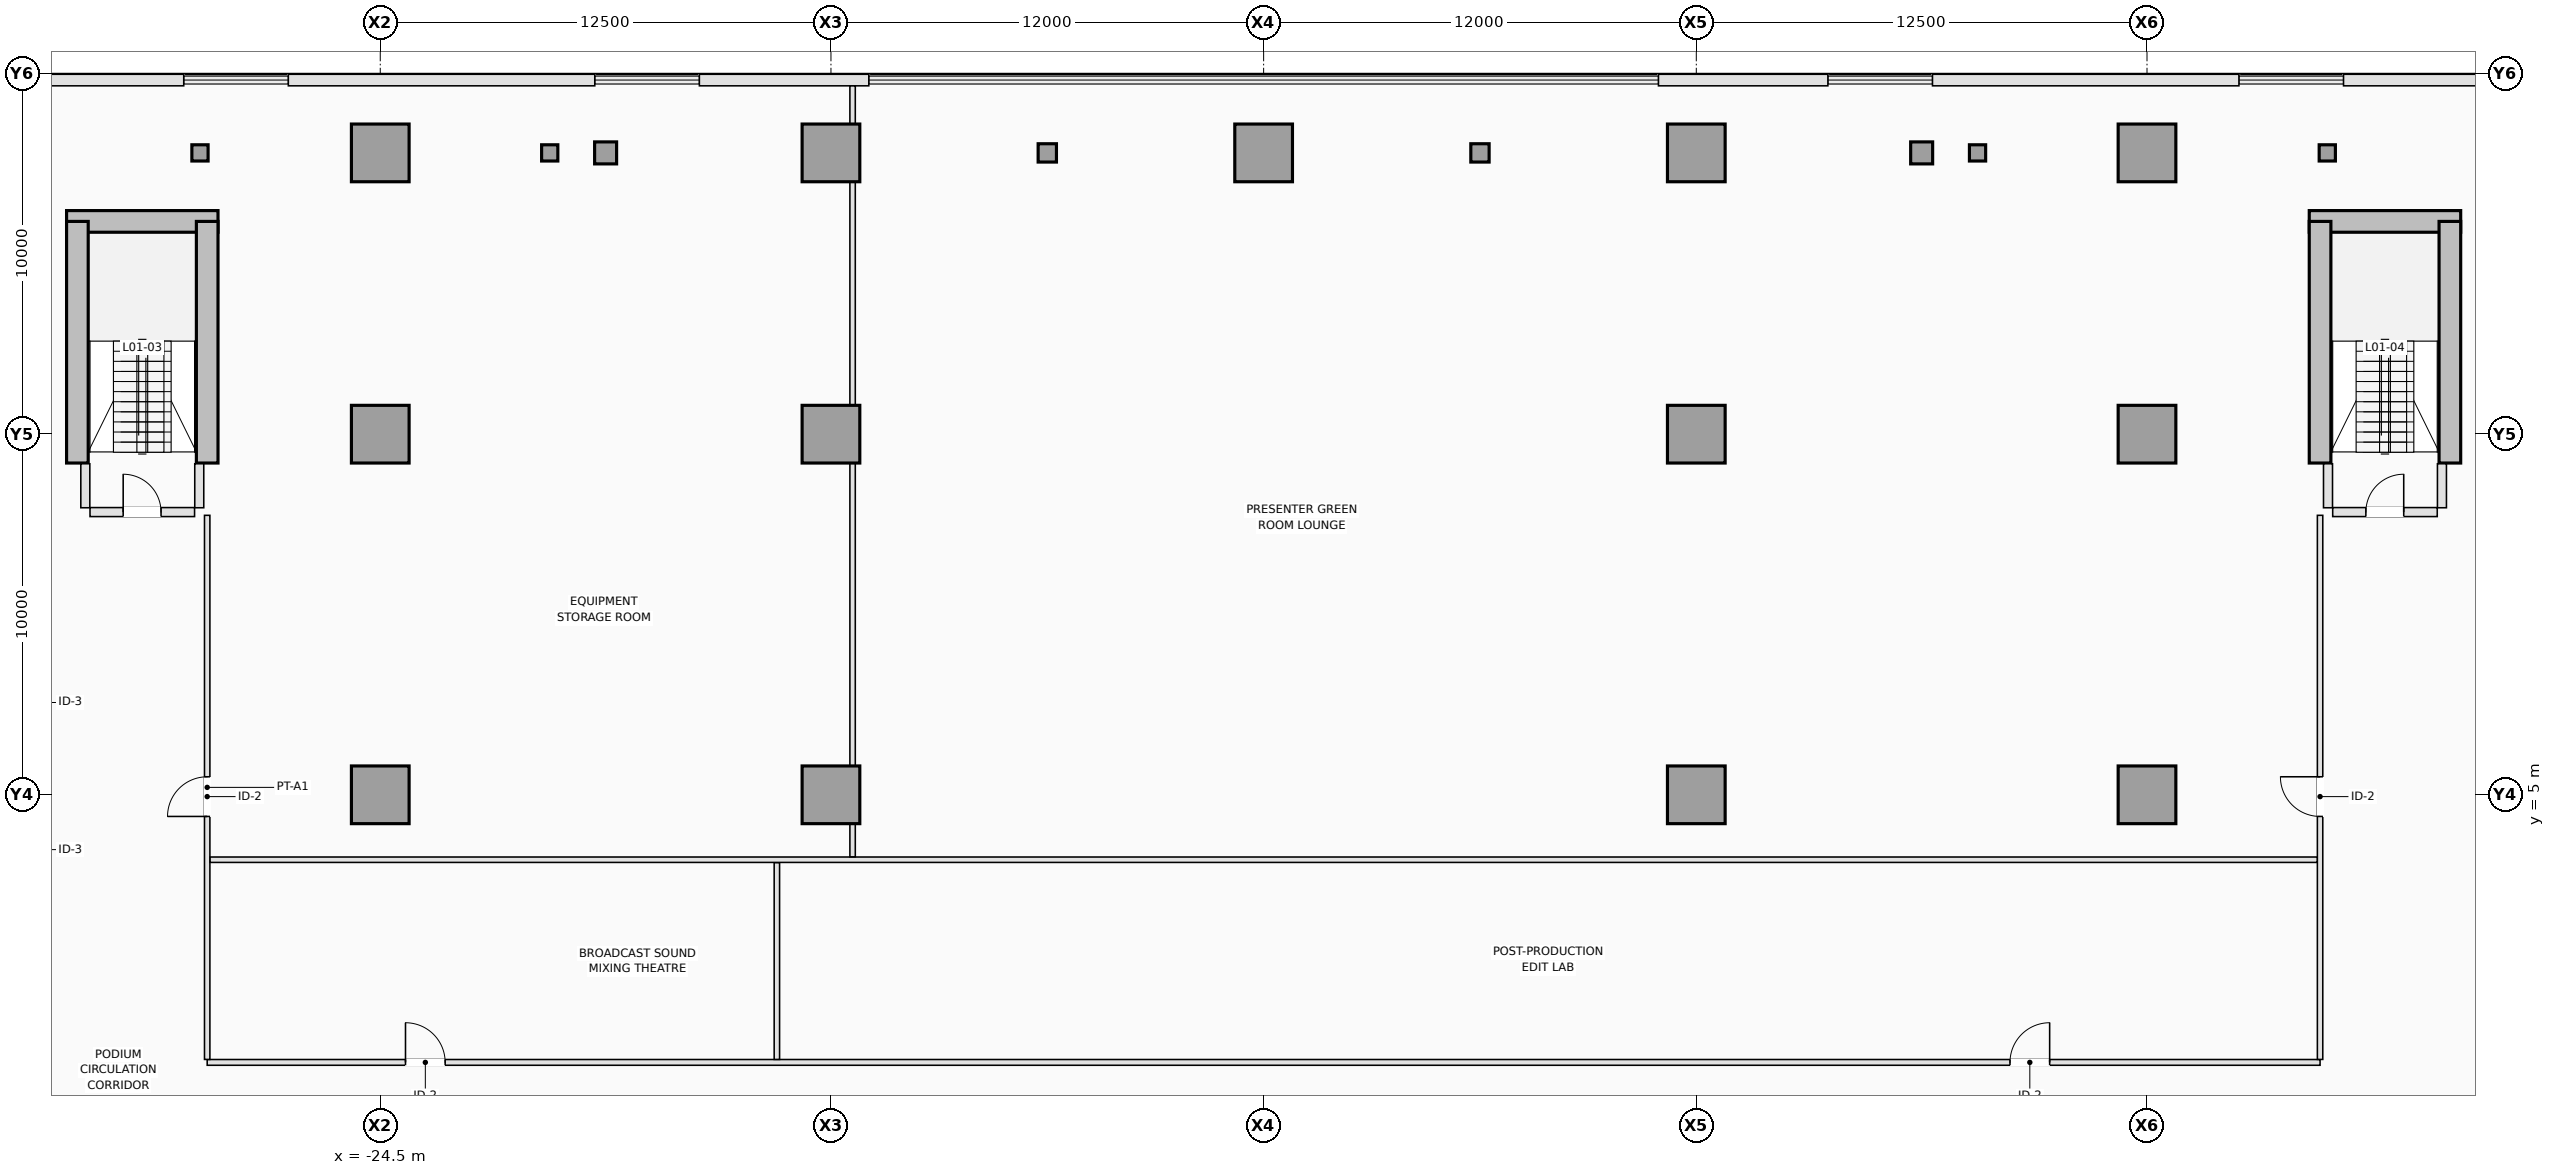
"""IFC4 building model, lengths in metres.
Left out: names, types, materials, properties, quantities, classifications, styles, units other than length and angle.
Written with IfcOpenShell. Run it as: python <this file> out.ifc"""

import sys

from ifc_helpers import new_model, si_unit, direction, frame, frame_2d, origin, origin_2d, place, context, subcontext, project, spatial, rectangle, hollow_circle, extrude, element, fill, save


model = new_model("IFC4")
c1 = context("Model", 3, precision=1e-05, world=origin(), true_north=direction((0.0, 1.0)))
c2 = subcontext(c1, "Body", "Model", "MODEL_VIEW")
j1 = project(units=[si_unit("LENGTHUNIT", "METRE"), si_unit("PLANEANGLEUNIT", "RADIAN")], contexts=[c1])
p1 = place(None, origin())
s1 = spatial("IfcSite", under=j1, at=p1, CompositionType="ELEMENT")
p2 = place(p1, origin())
s2 = spatial("IfcBuilding", under=s1, at=p2, CompositionType="ELEMENT")
p3 = place(p2, frame((0.0, 0.0, 5.0)))
s3 = spatial("IfcBuildingStorey", under=s2, at=p3, CompositionType="ELEMENT", Elevation=5.0)
p4 = place(p3, frame((-33.2, 20.9, 0.0), z_axis=(0.0, 0.0, 1.0), x_axis=(1.0, 0.0, 0.0)))
e1 = element("IfcWall", 1, at=p4, inside=s3, PredefinedType="SHEAR", context=c2, shape_type="SweptSolid", body=[
    extrude(rectangle(XDim=4.2, YDim=0.6, at=frame_2d((2.1, 0.0))), origin(), (0.0, 0.0, 1.0), 4.5),
])
for number, where, z_axis, x_axis in (
    (2, (-32.9, 14.2, 0.0), (0.0, 0.0, 1.0), (0.0, 1.0, 0.0)),
    (3, (-29.3, 14.2, 0.0), (0.0, 0.0, 1.0), (0.0, 1.0, 0.0)),
):
    element("IfcWall", number, at=place(p3, frame(where, z_axis=z_axis, x_axis=x_axis)), inside=s3, PredefinedType="SHEAR", context=c2, shape_type="SweptSolid", body=[
        extrude(rectangle(XDim=6.7, YDim=0.6, at=frame_2d((3.35, 0.0))), origin(), (0.0, 0.0, 1.0), 4.5),
    ])
p5 = place(p3, frame((29.0, 20.9, 0.0), z_axis=(0.0, 0.0, 1.0), x_axis=(1.0, 0.0, 0.0)))
e4 = element("IfcWall", 4, at=p5, inside=s3, PredefinedType="SHEAR", context=c2, shape_type="SweptSolid", body=[
    extrude(rectangle(XDim=4.2, YDim=0.6, at=frame_2d((2.1, 0.0))), origin(), (0.0, 0.0, 1.0), 4.5),
])
for number, where, z_axis, x_axis in (
    (5, (29.3, 14.2, 0.0), (0.0, 0.0, 1.0), (0.0, 1.0, 0.0)),
    (6, (32.9, 14.2, 0.0), (0.0, 0.0, 1.0), (0.0, 1.0, 0.0)),
):
    element("IfcWall", number, at=place(p3, frame(where, z_axis=z_axis, x_axis=x_axis)), inside=s3, PredefinedType="SHEAR", context=c2, shape_type="SweptSolid", body=[
        extrude(rectangle(XDim=6.7, YDim=0.6, at=frame_2d((3.35, 0.0))), origin(), (0.0, 0.0, 1.0), 4.5),
    ])
for number, where, z_axis, x_axis in (
    (7, (-24.5, 5.0, 0.0), (0.0, 0.0, 1.0), (1.0, 0.0, 0.0)),
    (8, (-12.0, 5.0, 0.0), (0.0, 0.0, 1.0), (1.0, 0.0, 0.0)),
    (9, (12.0, 5.0, 0.0), (0.0, 0.0, 1.0), (1.0, 0.0, 0.0)),
    (10, (24.5, 5.0, 0.0), (0.0, 0.0, 1.0), (1.0, 0.0, 0.0)),
    (11, (-24.5, 15.0, 0.0), (0.0, 0.0, 1.0), (1.0, 0.0, 0.0)),
    (12, (-12.0, 15.0, 0.0), (0.0, 0.0, 1.0), (1.0, 0.0, 0.0)),
    (13, (12.0, 15.0, 0.0), (0.0, 0.0, 1.0), (1.0, 0.0, 0.0)),
    (14, (24.5, 15.0, 0.0), (0.0, 0.0, 1.0), (1.0, 0.0, 0.0)),
    (15, (-24.5, 22.8, 0.0), (0.0, 0.0, 1.0), (1.0, 0.0, 0.0)),
    (16, (-12.0, 22.8, 0.0), (0.0, 0.0, 1.0), (1.0, 0.0, 0.0)),
    (17, (0.0, 22.8, 0.0), (0.0, 0.0, 1.0), (1.0, 0.0, 0.0)),
    (18, (12.0, 22.8, 0.0), (0.0, 0.0, 1.0), (1.0, 0.0, 0.0)),
    (19, (24.5, 22.8, 0.0), (0.0, 0.0, 1.0), (1.0, 0.0, 0.0)),
):
    element("IfcColumn", number, at=place(p3, frame(where, z_axis=z_axis, x_axis=x_axis)), inside=s3, PredefinedType="COLUMN", context=c2, shape_type="SweptSolid", body=[
        extrude(rectangle(XDim=1.6, YDim=1.6, at=origin_2d()), origin(), (0.0, 0.0, 1.0), 4.5),
    ])
for number, where, z_axis, x_axis in (
    (20, (-18.25, 22.8, 0.0), (0.0, 0.0, 1.0), (1.0, 0.0, 0.0)),
    (21, (18.25, 22.8, 0.0), (0.0, 0.0, 1.0), (1.0, 0.0, 0.0)),
):
    element("IfcColumn", number, at=place(p3, frame(where, z_axis=z_axis, x_axis=x_axis)), inside=s3, PredefinedType="COLUMN", context=c2, shape_type="SweptSolid", body=[
        extrude(hollow_circle(Radius=0.305, WallThickness=0.025, at=origin_2d()), origin(), (0.0, 0.0, 1.0), 4.5),
    ])
for number, where, z_axis, x_axis in (
    (22, (-6.0, 22.8, 0.0), (0.0, 0.0, 1.0), (1.0, 0.0, 0.0)),
    (23, (6.0, 22.8, 0.0), (0.0, 0.0, 1.0), (1.0, 0.0, 0.0)),
):
    element("IfcColumn", number, at=place(p3, frame(where, z_axis=z_axis, x_axis=x_axis)), inside=s3, PredefinedType="COLUMN", context=c2, shape_type="SweptSolid", body=[
        extrude(hollow_circle(Radius=0.254, WallThickness=0.022, at=origin_2d()), origin(), (0.0, 0.0, 1.0), 4.5),
    ])
for number, where, z_axis, x_axis in (
    (24, (-29.5, 22.8, 0.0), (0.0, 0.0, 1.0), (1.0, 0.0, 0.0)),
    (25, (-19.8, 22.8, 0.0), (0.0, 0.0, 1.0), (1.0, 0.0, 0.0)),
    (26, (19.8, 22.8, 0.0), (0.0, 0.0, 1.0), (1.0, 0.0, 0.0)),
    (27, (29.5, 22.8, 0.0), (0.0, 0.0, 1.0), (1.0, 0.0, 0.0)),
):
    element("IfcColumn", number, at=place(p3, frame(where, z_axis=z_axis, x_axis=x_axis)), inside=s3, PredefinedType="PILASTER", context=c2, shape_type="SweptSolid", body=[
        extrude(rectangle(XDim=0.45, YDim=0.45, at=origin_2d()), origin(), (0.0, 0.0, 1.0), 4.5),
    ])
p6 = place(p3, frame((-34.9, 24.82, 0.0), z_axis=(0.0, 0.0, 1.0), x_axis=(1.0, 0.0, 0.0)))
e28 = element("IfcWall", 28, at=p6, inside=s3, PredefinedType="STANDARD", context=c2, shape_type="SweptSolid", body=[
    extrude(rectangle(XDim=4.949, YDim=0.32, at=frame_2d((2.475, 0.0))), origin(), (0.0, 0.0, 1.0), 4.2),
])
p7 = place(p3, frame((-27.05, 24.82, 0.0), z_axis=(0.0, 0.0, 1.0), x_axis=(1.0, 0.0, 0.0)))
e29 = element("IfcWall", 29, at=p7, inside=s3, PredefinedType="STANDARD", context=c2, shape_type="SweptSolid", body=[
    extrude(rectangle(XDim=8.499, YDim=0.32, at=frame_2d((4.25, 0.0))), origin(), (0.0, 0.0, 1.0), 4.2),
])
for number, where, z_axis, x_axis in (
    (30, (-15.649, 24.82, 0.0), (0.0, 0.0, 1.0), (1.0, 0.0, 0.0)),
    (31, (10.95, 24.82, 0.0), (0.0, 0.0, 1.0), (1.0, 0.0, 0.0)),
):
    element("IfcWall", number, at=place(p3, frame(where, z_axis=z_axis, x_axis=x_axis)), inside=s3, PredefinedType="STANDARD", context=c2, shape_type="SweptSolid", body=[
        extrude(rectangle(XDim=4.699, YDim=0.32, at=frame_2d((2.35, 0.0))), origin(), (0.0, 0.0, 1.0), 4.2),
    ])
p8 = place(p3, frame((18.551, 24.82, 0.0), z_axis=(0.0, 0.0, 1.0), x_axis=(1.0, 0.0, 0.0)))
e32 = element("IfcWall", 32, at=p8, inside=s3, PredefinedType="STANDARD", context=c2, shape_type="SweptSolid", body=[
    extrude(rectangle(XDim=8.499, YDim=0.32, at=frame_2d((4.25, 0.0))), origin(), (0.0, 0.0, 1.0), 4.2),
])
p9 = place(p3, frame((29.95, 24.82, 0.0), z_axis=(0.0, 0.0, 1.0), x_axis=(1.0, 0.0, 0.0)))
e33 = element("IfcWall", 33, at=p9, inside=s3, PredefinedType="STANDARD", context=c2, shape_type="SweptSolid", body=[
    extrude(rectangle(XDim=4.949, YDim=0.32, at=frame_2d((2.475, 0.0))), origin(), (0.0, 0.0, 1.0), 4.2),
])
p10 = place(p3, frame((-32.55, 12.84, 0.0), z_axis=(0.0, 0.0, 1.0), x_axis=(1.0, 0.0, 0.0)))
e34 = element("IfcWall", 34, at=p10, inside=s3, PredefinedType="PARTITIONING", context=c2, shape_type="SweptSolid", body=[
    extrude(rectangle(XDim=2.9, YDim=0.25, at=frame_2d((1.45, 0.0))), origin(), (0.0, 0.0, 1.0), 4.2),
])
p11 = place(p10, frame((0.92, 0.0, 0.0)))
e35 = element("IfcOpeningElement", 35, at=p11, cuts=e34, PredefinedType="OPENING", context=c2, shape_type="SweptSolid", body=[
    extrude(rectangle(XDim=1.05, YDim=2.15, at=frame_2d((0.525, 1.075))), frame((0.0, 0.135, 0.0), z_axis=(0.0, -1.0, 0.0), x_axis=(1.0, 0.0, 0.0)), (0.0, 0.0, 1.0), 0.27),
])
p12 = place(p3, frame((29.65, 12.84, 0.0), z_axis=(0.0, 0.0, 1.0), x_axis=(1.0, 0.0, 0.0)))
e36 = element("IfcWall", 36, at=p12, inside=s3, PredefinedType="PARTITIONING", context=c2, shape_type="SweptSolid", body=[
    extrude(rectangle(XDim=2.9, YDim=0.25, at=frame_2d((1.45, 0.0))), origin(), (0.0, 0.0, 1.0), 4.2),
])
p13 = place(p12, frame((0.92, 0.0, 0.0)))
e37 = element("IfcOpeningElement", 37, at=p13, cuts=e36, PredefinedType="OPENING", context=c2, shape_type="SweptSolid", body=[
    extrude(rectangle(XDim=1.05, YDim=2.15, at=frame_2d((0.525, 1.075))), frame((0.0, 0.135, 0.0), z_axis=(0.0, -1.0, 0.0), x_axis=(1.0, 0.0, 0.0)), (0.0, 0.0, 1.0), 0.27),
])
for number, where, z_axis, x_axis in (
    (38, (-32.68, 12.96, 0.0), (0.0, 0.0, 1.0), (0.0, 1.0, 0.0)),
    (39, (-29.52, 12.96, 0.0), (0.0, 0.0, 1.0), (0.0, 1.0, 0.0)),
    (40, (29.52, 12.96, 0.0), (0.0, 0.0, 1.0), (0.0, 1.0, 0.0)),
    (41, (32.68, 12.96, 0.0), (0.0, 0.0, 1.0), (0.0, 1.0, 0.0)),
):
    element("IfcWall", number, at=place(p3, frame(where, z_axis=z_axis, x_axis=x_axis)), inside=s3, PredefinedType="PARTITIONING", context=c2, shape_type="SweptSolid", body=[
        extrude(rectangle(XDim=1.22, YDim=0.25, at=frame_2d((0.61, 0.0))), origin(), (0.0, 0.0, 1.0), 4.2),
    ])
p14 = place(p3, frame((-29.3, -2.42, 0.0), z_axis=(0.0, 0.0, 1.0), x_axis=(1.0, 0.0, 0.0)))
e42 = element("IfcWall", 42, at=p14, inside=s3, PredefinedType="PARTITIONING", context=c2, shape_type="SweptSolid", body=[
    extrude(rectangle(XDim=58.6, YDim=0.16, at=frame_2d((29.3, 0.0))), origin(), (0.0, 0.0, 1.0), 4.2),
])
p15 = place(p14, frame((5.5, 0.0, 0.0)))
e43 = element("IfcOpeningElement", 43, at=p15, cuts=e42, PredefinedType="OPENING", context=c2, shape_type="SweptSolid", body=[
    extrude(rectangle(XDim=1.1, YDim=2.15, at=frame_2d((0.55, 1.075))), frame((0.0, 0.09, 0.0), z_axis=(0.0, -1.0, 0.0), x_axis=(1.0, 0.0, 0.0)), (0.0, 0.0, 1.0), 0.18),
])
p16 = place(p14, frame((50.0, 0.0, 0.0)))
e44 = element("IfcOpeningElement", 44, at=p16, cuts=e42, PredefinedType="OPENING", context=c2, shape_type="SweptSolid", body=[
    extrude(rectangle(XDim=1.1, YDim=2.15, at=frame_2d((0.55, 1.075))), frame((0.0, 0.09, 0.0), z_axis=(0.0, -1.0, 0.0), x_axis=(1.0, 0.0, 0.0)), (0.0, 0.0, 1.0), 0.18),
])
p17 = place(p3, frame((-29.3, -2.338, 0.0), z_axis=(0.0, 0.0, 1.0), x_axis=(0.0, 1.0, 0.0)))
e45 = element("IfcWall", 45, at=p17, inside=s3, PredefinedType="PARTITIONING", context=c2, shape_type="SweptSolid", body=[
    extrude(rectangle(XDim=15.088, YDim=0.15, at=frame_2d((7.544, 0.0))), origin(), (0.0, 0.0, 1.0), 4.2),
])
p18 = place(p17, frame((6.738, 0.0, 0.0)))
e46 = element("IfcOpeningElement", 46, at=p18, cuts=e45, PredefinedType="OPENING", context=c2, shape_type="SweptSolid", body=[
    extrude(rectangle(XDim=1.1, YDim=2.15, at=frame_2d((0.55, 1.075))), frame((0.0, 0.085, 0.0), z_axis=(0.0, -1.0, 0.0), x_axis=(1.0, 0.0, 0.0)), (0.0, 0.0, 1.0), 0.17),
])
p19 = place(p3, frame((29.3, -2.338, 0.0), z_axis=(0.0, 0.0, 1.0), x_axis=(0.0, 1.0, 0.0)))
e47 = element("IfcWall", 47, at=p19, inside=s3, PredefinedType="PARTITIONING", context=c2, shape_type="SweptSolid", body=[
    extrude(rectangle(XDim=15.088, YDim=0.15, at=frame_2d((7.544, 0.0))), origin(), (0.0, 0.0, 1.0), 4.2),
])
p20 = place(p19, frame((6.738, 0.0, 0.0)))
e48 = element("IfcOpeningElement", 48, at=p20, cuts=e47, PredefinedType="OPENING", context=c2, shape_type="SweptSolid", body=[
    extrude(rectangle(XDim=1.1, YDim=2.15, at=frame_2d((0.55, 1.075))), frame((0.0, 0.085, 0.0), z_axis=(0.0, -1.0, 0.0), x_axis=(1.0, 0.0, 0.0)), (0.0, 0.0, 1.0), 0.17),
])
p21 = place(p3, frame((-13.5, -2.338, 0.0), z_axis=(0.0, 0.0, 1.0), x_axis=(0.0, 1.0, 0.0)))
e49 = element("IfcWall", 49, at=p21, inside=s3, PredefinedType="PARTITIONING", context=c2, shape_type="SweptSolid", body=[
    extrude(rectangle(XDim=5.458, YDim=0.15, at=frame_2d((2.729, 0.0))), origin(), (0.0, 0.0, 1.0), 4.2),
])
p22 = place(p3, frame((-29.22, 3.2, 0.0), z_axis=(0.0, 0.0, 1.0), x_axis=(1.0, 0.0, 0.0)))
e50 = element("IfcWall", 50, at=p22, inside=s3, PredefinedType="PARTITIONING", context=c2, shape_type="SweptSolid", body=[
    extrude(rectangle(XDim=58.44, YDim=0.15, at=frame_2d((29.22, 0.0))), origin(), (0.0, 0.0, 1.0), 4.2),
])
p23 = place(p3, frame((-11.4, 3.28, 0.0), z_axis=(0.0, 0.0, 1.0), x_axis=(0.0, 1.0, 0.0)))
e51 = element("IfcWall", 51, at=p23, inside=s3, PredefinedType="PARTITIONING", context=c2, shape_type="SweptSolid", body=[
    extrude(rectangle(XDim=0.918, YDim=0.15, at=frame_2d((0.459, 0.0))), origin(), (0.0, 0.0, 1.0), 4.2),
])
p24 = place(p3, frame((-11.4, 5.802, 0.0), z_axis=(0.0, 0.0, 1.0), x_axis=(0.0, 1.0, 0.0)))
e52 = element("IfcWall", 52, at=p24, inside=s3, PredefinedType="PARTITIONING", context=c2, shape_type="SweptSolid", body=[
    extrude(rectangle(XDim=8.396, YDim=0.15, at=frame_2d((4.198, 0.0))), origin(), (0.0, 0.0, 1.0), 4.2),
])
p25 = place(p3, frame((-11.4, 15.802, 0.0), z_axis=(0.0, 0.0, 1.0), x_axis=(0.0, 1.0, 0.0)))
e53 = element("IfcWall", 53, at=p25, inside=s3, PredefinedType="PARTITIONING", context=c2, shape_type="SweptSolid", body=[
    extrude(rectangle(XDim=6.196, YDim=0.15, at=frame_2d((3.098, 0.0))), origin(), (0.0, 0.0, 1.0), 4.2),
])
p26 = place(p3, frame((-11.4, 23.602, 0.0), z_axis=(0.0, 0.0, 1.0), x_axis=(0.0, 1.0, 0.0)))
e54 = element("IfcWall", 54, at=p26, inside=s3, PredefinedType="PARTITIONING", context=c2, shape_type="SweptSolid", body=[
    extrude(rectangle(XDim=1.056, YDim=0.15, at=frame_2d((0.528, 0.0))), origin(), (0.0, 0.0, 1.0), 4.2),
])
p27 = place(p11, origin())
e55 = element("IfcDoor", 55, at=p27, inside=s3, OperationType="SINGLE_SWING_LEFT", PredefinedType="DOOR", context=c2, shape_type="SweptSolid", body=[
    extrude(rectangle(XDim=1.05, YDim=2.15, at=frame_2d((0.525, 1.075))), frame((0.0, 0.025, 0.0), z_axis=(0.0, -1.0, 0.0), x_axis=(1.0, 0.0, 0.0)), (0.0, 0.0, 1.0), 0.05),
])
fill(e35, e55)
p28 = place(p13, origin())
e56 = element("IfcDoor", 56, at=p28, inside=s3, OperationType="SINGLE_SWING_RIGHT", PredefinedType="DOOR", context=c2, shape_type="SweptSolid", body=[
    extrude(rectangle(XDim=1.05, YDim=2.15, at=frame_2d((0.525, 1.075))), frame((0.0, 0.025, 0.0), z_axis=(0.0, -1.0, 0.0), x_axis=(1.0, 0.0, 0.0)), (0.0, 0.0, 1.0), 0.05),
])
fill(e37, e56)
p29 = place(p15, origin())
e57 = element("IfcDoor", 57, at=p29, inside=s3, OperationType="SINGLE_SWING_LEFT", PredefinedType="DOOR", context=c2, shape_type="SweptSolid", body=[
    extrude(rectangle(XDim=1.1, YDim=2.15, at=frame_2d((0.55, 1.075))), frame((0.0, 0.025, 0.0), z_axis=(0.0, -1.0, 0.0), x_axis=(1.0, 0.0, 0.0)), (0.0, 0.0, 1.0), 0.05),
])
fill(e43, e57)
p30 = place(p16, origin())
e58 = element("IfcDoor", 58, at=p30, inside=s3, OperationType="SINGLE_SWING_RIGHT", PredefinedType="DOOR", context=c2, shape_type="SweptSolid", body=[
    extrude(rectangle(XDim=1.1, YDim=2.15, at=frame_2d((0.55, 1.075))), frame((0.0, 0.025, 0.0), z_axis=(0.0, -1.0, 0.0), x_axis=(1.0, 0.0, 0.0)), (0.0, 0.0, 1.0), 0.05),
])
fill(e44, e58)
p31 = place(p18, origin())
e59 = element("IfcDoor", 59, at=p31, inside=s3, OperationType="SINGLE_SWING_LEFT", PredefinedType="DOOR", context=c2, shape_type="SweptSolid", body=[
    extrude(rectangle(XDim=1.1, YDim=2.15, at=frame_2d((0.55, 1.075))), frame((0.0, 0.025, 0.0), z_axis=(0.0, -1.0, 0.0), x_axis=(1.0, 0.0, 0.0)), (0.0, 0.0, 1.0), 0.05),
])
fill(e46, e59)
p32 = place(p20, origin())
e60 = element("IfcDoor", 60, at=p32, inside=s3, OperationType="SINGLE_SWING_RIGHT", PredefinedType="DOOR", context=c2, shape_type="SweptSolid", body=[
    extrude(rectangle(XDim=1.1, YDim=2.15, at=frame_2d((0.55, 1.075))), frame((0.0, 0.025, 0.0), z_axis=(0.0, -1.0, 0.0), x_axis=(1.0, 0.0, 0.0)), (0.0, 0.0, 1.0), 0.05),
])
fill(e48, e60)
save(model, sys.argv[1])
